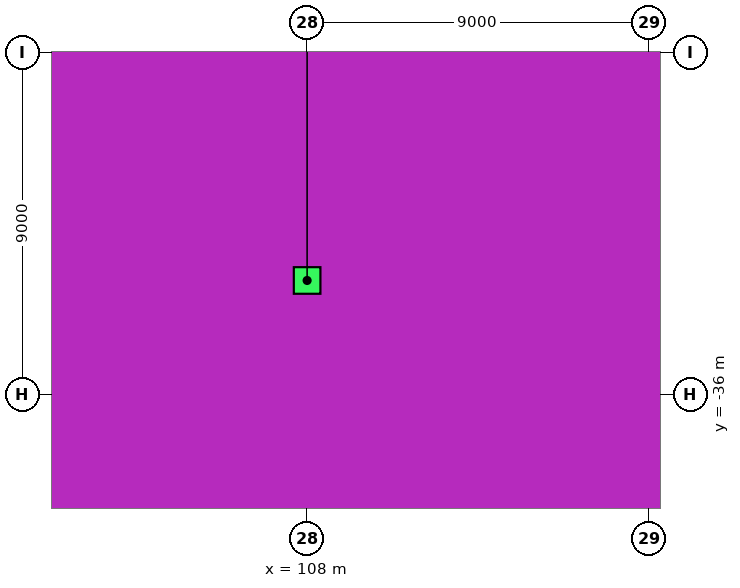
"""IFC4 building model, lengths in metres.
Left out: names, types, materials, properties, quantities, classifications, styles, units other than length and angle.
Written with IfcOpenShell. Run it as: python <this file> out.ifc"""

import sys

from ifc_helpers import new_model, si_unit, direction, frame, origin, origin_2d, place, context, subcontext, project, spatial, rectangle, extrude, element, save


model = new_model("IFC4")
c1 = context("Model", 3, precision=1e-05, world=origin(), true_north=direction((0.0, 1.0)))
c2 = subcontext(c1, "Body", "Model", "MODEL_VIEW")
j1 = project(units=[si_unit("LENGTHUNIT", "METRE"), si_unit("PLANEANGLEUNIT", "RADIAN")], contexts=[c1])
p1 = place(None, origin())
s1 = spatial("IfcSite", under=j1, at=p1, CompositionType="ELEMENT")
p2 = place(p1, origin())
s2 = spatial("IfcBuilding", under=s1, at=p2, CompositionType="ELEMENT")
p3 = place(p2, frame((0.0, 0.0, -4.5)))
s3 = spatial("IfcBuildingStorey", under=s2, at=p3, CompositionType="ELEMENT", Elevation=-4.5)
p4 = place(p3, frame((108.0, -33.0, 0.0), z_axis=(0.0, 0.0, 1.0), x_axis=(1.0, 0.0, 0.0)))
e1 = element("IfcColumn", 1, at=p4, inside=s3, PredefinedType="COLUMN", context=c2, shape_type="SweptSolid", body=[
    extrude(rectangle(XDim=0.7, YDim=0.7, at=origin_2d()), origin(), (0.0, 0.0, 1.0), 4.0),
])
save(model, sys.argv[1])
